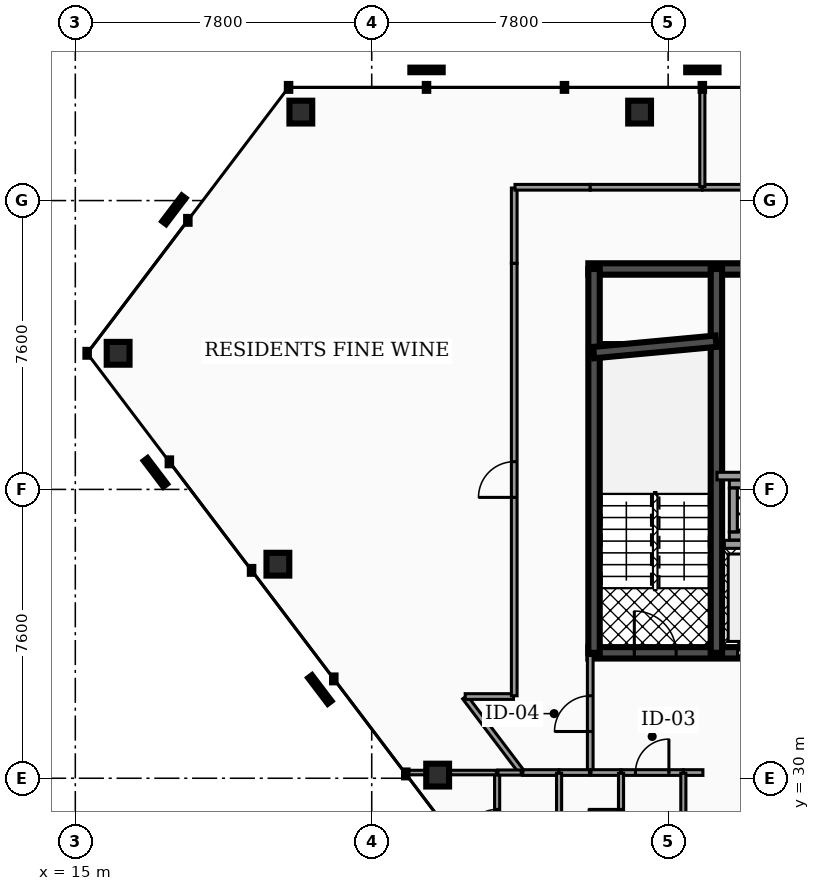
"""IFC4 building model, lengths in metres.
Left out: names, types, materials, properties, quantities, classifications, styles, units other than length and angle.
Written with IfcOpenShell. Run it as: python <this file> out.ifc"""

import sys

from ifc_helpers import new_model, si_unit, direction, frame, frame_2d, origin, origin_2d, place, context, subcontext, project, spatial, rectangle, hollow_rectangle, extrude, element, fill, save


model = new_model("IFC4")
c1 = context("Model", 3, precision=1e-05, world=origin(), true_north=direction((0.0, 1.0)))
c2 = subcontext(c1, "Body", "Model", "MODEL_VIEW")
j1 = project(units=[si_unit("LENGTHUNIT", "METRE"), si_unit("PLANEANGLEUNIT", "RADIAN")], contexts=[c1])
p1 = place(None, origin())
s1 = spatial("IfcSite", under=j1, at=p1, CompositionType="ELEMENT")
p2 = place(p1, origin())
s2 = spatial("IfcBuilding", under=s1, at=p2, CompositionType="ELEMENT")
p3 = place(p2, frame((0.0, 0.0, 232.56)))
s3 = spatial("IfcBuildingStorey", under=s2, at=p3, CompositionType="ELEMENT", Elevation=232.56)
p4 = place(p3, frame((28.5, 43.4, 0.0), z_axis=(0.0, 0.0, 1.0), x_axis=(1.0, 0.0, 0.0)))
e1 = element("IfcWall", 1, at=p4, inside=s3, PredefinedType="SHEAR", context=c2, shape_type="SweptSolid", body=[
    extrude(rectangle(XDim=19.86, YDim=0.3, at=frame_2d((9.93, 0.0))), origin(), (0.0, 0.0, 1.0), 3.18),
])
p5 = place(p3, frame((28.5, 33.3, 0.0), z_axis=(0.0, 0.0, 1.0), x_axis=(1.0, 0.0, 0.0)))
e2 = element("IfcWall", 2, at=p5, inside=s3, PredefinedType="SHEAR", context=c2, shape_type="SweptSolid", body=[
    extrude(rectangle(XDim=19.86, YDim=0.3, at=frame_2d((9.93, 0.0))), origin(), (0.0, 0.0, 1.0), 3.18),
])
p6 = place(p5, frame((3.93, 0.0, 0.0)))
e3 = element("IfcOpeningElement", 3, at=p6, cuts=e2, PredefinedType="OPENING", context=c2, shape_type="SweptSolid", body=[
    extrude(rectangle(XDim=1.1, YDim=2.15, at=frame_2d((0.55, 1.075))), frame((0.0, 0.16, 0.0), z_axis=(0.0, -1.0, 0.0), x_axis=(1.0, 0.0, 0.0)), (0.0, 0.0, 1.0), 0.32),
])
p7 = place(p5, frame((14.77, 0.0, 0.0)))
e4 = element("IfcOpeningElement", 4, at=p7, cuts=e2, PredefinedType="OPENING", context=c2, shape_type="SweptSolid", body=[
    extrude(rectangle(XDim=1.1, YDim=2.15, at=frame_2d((0.55, 1.075))), frame((0.0, 0.16, 0.0), z_axis=(0.0, -1.0, 0.0), x_axis=(1.0, 0.0, 0.0)), (0.0, 0.0, 1.0), 0.32),
])
p8 = place(p5, frame((11.25, 0.0, 0.0)))
e5 = element("IfcOpeningElement", 5, at=p8, cuts=e2, PredefinedType="OPENING", context=c2, shape_type="SweptSolid", body=[
    extrude(rectangle(XDim=1.0, YDim=2.1, at=frame_2d((0.5, 1.05))), frame((0.0, 0.16, 0.0), z_axis=(0.0, -1.0, 0.0), x_axis=(1.0, 0.0, 0.0)), (0.0, 0.0, 1.0), 0.32),
])
p9 = place(p5, frame((12.95, 0.0, 0.0)))
e6 = element("IfcOpeningElement", 6, at=p9, cuts=e2, PredefinedType="OPENING", context=c2, shape_type="SweptSolid", body=[
    extrude(rectangle(XDim=1.0, YDim=2.1, at=frame_2d((0.5, 1.05))), frame((0.0, 0.16, 0.0), z_axis=(0.0, -1.0, 0.0), x_axis=(1.0, 0.0, 0.0)), (0.0, 0.0, 1.0), 0.32),
])
p10 = place(p5, frame((5.85, 0.0, 0.0)))
e7 = element("IfcOpeningElement", 7, at=p10, cuts=e2, PredefinedType="OPENING", context=c2, shape_type="SweptSolid", body=[
    extrude(rectangle(XDim=1.0, YDim=2.1, at=frame_2d((0.5, 1.05))), frame((0.0, 0.16, 0.0), z_axis=(0.0, -1.0, 0.0), x_axis=(1.0, 0.0, 0.0)), (0.0, 0.0, 1.0), 0.32),
])
p11 = place(p5, frame((1.21, 0.0, 0.0)))
e8 = element("IfcOpeningElement", 8, at=p11, cuts=e2, PredefinedType="OPENING", context=c2, shape_type="SweptSolid", body=[
    extrude(rectangle(XDim=1.1, YDim=2.2, at=frame_2d((0.55, 1.1))), frame((0.0, 0.16, 0.0), z_axis=(0.0, -1.0, 0.0), x_axis=(1.0, 0.0, 0.0)), (0.0, 0.0, 1.0), 0.32),
])
p12 = place(p5, frame((9.34, 0.0, 0.0)))
e9 = element("IfcOpeningElement", 9, at=p12, cuts=e2, PredefinedType="OPENING", context=c2, shape_type="SweptSolid", body=[
    extrude(rectangle(XDim=1.12, YDim=2.05, at=frame_2d((0.56, 1.025))), frame((0.0, 0.16, 0.0), z_axis=(0.0, -1.0, 0.0), x_axis=(1.0, 0.0, 0.0)), (0.0, 0.0, 1.0), 0.32),
])
p13 = place(p5, frame((17.55, 0.0, 0.0)))
e10 = element("IfcOpeningElement", 10, at=p13, cuts=e2, PredefinedType="OPENING", context=c2, shape_type="SweptSolid", body=[
    extrude(rectangle(XDim=1.1, YDim=2.2, at=frame_2d((0.55, 1.1))), frame((0.0, 0.16, 0.0), z_axis=(0.0, -1.0, 0.0), x_axis=(1.0, 0.0, 0.0)), (0.0, 0.0, 1.0), 0.32),
])
for number, where, z_axis, x_axis in (
    (11, (28.65, 33.3, 0.0), (0.0, 0.0, 1.0), (0.0, 1.0, 0.0)),
    (12, (31.87, 33.3, 0.0), (0.0, 0.0, 1.0), (0.0, 1.0, 0.0)),
):
    element("IfcWall", number, at=place(p3, frame(where, z_axis=z_axis, x_axis=x_axis)), inside=s3, PredefinedType="SHEAR", context=c2, shape_type="SweptSolid", body=[
        extrude(rectangle(XDim=10.1, YDim=0.3, at=frame_2d((5.05, 0.0))), origin(), (0.0, 0.0, 1.0), 3.18),
    ])
p14 = place(p3, frame((28.64, 41.2, 0.0), z_axis=(0.0, 0.0, 1.0), x_axis=(0.995687118776, 0.092774789157, 0.0)))
e13 = element("IfcWall", 13, at=p14, inside=s3, PredefinedType="SHEAR", context=c2, shape_type="SweptSolid", body=[
    extrude(rectangle(XDim=3.234, YDim=0.3, at=frame_2d((1.617, 0.0))), origin(), (0.0, 0.0, 1.0), 3.18),
])
for number, where, z_axis, x_axis in (
    (14, (29.849, 47.528, 0.0), (0.0, 0.0, 1.0), (1.0, 0.0, 0.0)),
    (15, (20.935, 47.528, 0.0), (0.0, 0.0, 1.0), (1.0, 0.0, 0.0)),
    (16, (16.127, 41.181, 0.0), (0.0, 0.0, 1.0), (1.0, 0.0, 0.0)),
    (17, (20.331, 35.632, 0.0), (0.0, 0.0, 1.0), (1.0, 0.0, 0.0)),
    (18, (24.535, 30.083, 0.0), (0.0, 0.0, 1.0), (1.0, 0.0, 0.0)),
):
    element("IfcColumn", number, at=place(p3, frame(where, z_axis=z_axis, x_axis=x_axis)), inside=s3, PredefinedType="COLUMN", context=c2, shape_type="SweptSolid", body=[
        extrude(hollow_rectangle(XDim=0.6, YDim=0.6, WallThickness=0.03, at=origin_2d()), origin(), (0.0, 0.0, 1.0), 3.18),
    ])
p15 = place(p3, frame((32.08, 36.155, 0.0), z_axis=(0.0, 0.0, 1.0), x_axis=(1.0, 0.0, 0.0)))
e19 = element("IfcWall", 19, at=p15, inside=s3, PredefinedType="SOLIDWALL", context=c2, shape_type="SweptSolid", body=[
    extrude(rectangle(XDim=1.8, YDim=0.21, at=frame_2d((0.9, 0.0))), origin(), (0.0, 0.0, 1.0), 3.18),
])
for number, where, z_axis, x_axis in (
    (20, (32.21, 36.375, 0.0), (0.0, 0.0, 1.0), (1.0, 0.0, 0.0)),
    (21, (32.21, 37.745, 0.0), (0.0, 0.0, 1.0), (1.0, 0.0, 0.0)),
):
    element("IfcWall", number, at=place(p3, frame(where, z_axis=z_axis, x_axis=x_axis)), inside=s3, PredefinedType="SOLIDWALL", context=c2, shape_type="SweptSolid", body=[
        extrude(rectangle(XDim=1.6, YDim=0.21, at=frame_2d((0.8, 0.0))), origin(), (0.0, 0.0, 1.0), 3.18),
    ])
p16 = place(p3, frame((32.315, 36.485, 0.0), z_axis=(0.0, 0.0, 1.0), x_axis=(0.0, 1.0, 0.0)))
e22 = element("IfcWall", 22, at=p16, inside=s3, PredefinedType="SOLIDWALL", context=c2, shape_type="SweptSolid", body=[
    extrude(rectangle(XDim=1.15, YDim=0.21, at=frame_2d((0.575, 0.0))), origin(), (0.0, 0.0, 1.0), 3.18),
])
p17 = place(p3, frame((31.885, 37.95, 0.0), z_axis=(0.0, 0.0, 1.0), x_axis=(1.0, 0.0, 0.0)))
e23 = element("IfcWall", 23, at=p17, inside=s3, PredefinedType="PARTITIONING", context=c2, shape_type="SweptSolid", body=[
    extrude(rectangle(XDim=3.895, YDim=0.2, at=frame_2d((1.948, 0.0))), origin(), (0.0, 0.0, 1.0), 2.235),
])
p18 = place(p3, frame((28.55, 30.17, 0.0), z_axis=(0.0, 0.0, 1.0), x_axis=(0.0, 1.0, 0.0)))
e24 = element("IfcWall", 24, at=p18, inside=s3, PredefinedType="PARTITIONING", context=c2, shape_type="SweptSolid", body=[
    extrude(rectangle(XDim=3.06, YDim=0.15, at=frame_2d((1.53, 0.0))), origin(), (0.0, 0.0, 1.0), 2.235),
])
p19 = place(p18, frame((1.06, 0.0, 0.0)))
e25 = element("IfcOpeningElement", 25, at=p19, cuts=e24, PredefinedType="OPENING", context=c2, shape_type="SweptSolid", body=[
    extrude(rectangle(XDim=0.94, YDim=2.05, at=frame_2d((0.47, 1.025))), frame((0.0, 0.085, 0.0), z_axis=(0.0, -1.0, 0.0), x_axis=(1.0, 0.0, 0.0)), (0.0, 0.0, 1.0), 0.17),
])
p20 = place(p3, frame((29.365, 30.15, 0.0), z_axis=(0.0, 0.0, 1.0), x_axis=(1.0, 0.0, 0.0)))
e26 = element("IfcWall", 26, at=p20, inside=s3, PredefinedType="PARTITIONING", context=c2, shape_type="SweptSolid", body=[
    extrude(rectangle(XDim=1.63, YDim=0.15, at=frame_2d((0.815, 0.0))), origin(), (0.0, 0.0, 1.0), 2.235),
])
p21 = place(p20, frame((0.375, 0.0, 0.0)))
e27 = element("IfcOpeningElement", 27, at=p21, cuts=e26, PredefinedType="OPENING", context=c2, shape_type="SweptSolid", body=[
    extrude(rectangle(XDim=0.88, YDim=2.05, at=frame_2d((0.44, 1.025))), frame((0.0, 0.085, 0.0), z_axis=(0.0, -1.0, 0.0), x_axis=(1.0, 0.0, 0.0)), (0.0, 0.0, 1.0), 0.17),
])
p22 = place(p3, frame((28.57, 30.15, 0.0), z_axis=(0.0, 0.0, 1.0), x_axis=(1.0, 0.0, 0.0)))
e28 = element("IfcWall", 28, at=p22, inside=s3, PredefinedType="PARTITIONING", context=c2, shape_type="SweptSolid", body=[
    extrude(rectangle(XDim=0.785, YDim=0.15, at=frame_2d((0.393, 0.0))), origin(), (0.0, 0.0, 1.0), 2.235),
])
p23 = place(p3, frame((31.005, 30.15, 0.0), z_axis=(0.0, 0.0, 1.0), x_axis=(1.0, 0.0, 0.0)))
e29 = element("IfcWall", 29, at=p23, inside=s3, PredefinedType="PARTITIONING", context=c2, shape_type="SweptSolid", body=[
    extrude(rectangle(XDim=0.51, YDim=0.15, at=frame_2d((0.255, 0.0))), origin(), (0.0, 0.0, 1.0), 2.235),
])
p24 = place(p3, frame((26.775, 30.15, 0.0), z_axis=(0.0, 0.0, 1.0), x_axis=(1.0, 0.0, 0.0)))
e30 = element("IfcWall", 30, at=p24, inside=s3, PredefinedType="PARTITIONING", context=c2, shape_type="SweptSolid", body=[
    extrude(rectangle(XDim=0.95, YDim=0.15, at=frame_2d((0.475, 0.0))), origin(), (0.0, 0.0, 1.0), 2.235),
])
p25 = place(p3, frame((27.735, 30.15, 0.0), z_axis=(0.0, 0.0, 1.0), x_axis=(1.0, 0.0, 0.0)))
e31 = element("IfcWall", 31, at=p25, inside=s3, PredefinedType="PARTITIONING", context=c2, shape_type="SweptSolid", body=[
    extrude(rectangle(XDim=0.795, YDim=0.15, at=frame_2d((0.397, 0.0))), origin(), (0.0, 0.0, 1.0), 2.235),
])
p26 = place(p3, frame((25.252, 32.134, 0.0), z_axis=(0.0, 0.0, 1.0), x_axis=(0.603869110647, -0.797083494502, 0.0)))
e32 = element("IfcWall", 32, at=p26, inside=s3, PredefinedType="PARTITIONING", context=c2, shape_type="SweptSolid", body=[
    extrude(rectangle(XDim=2.469, YDim=0.15, at=frame_2d((1.234, 0.0))), origin(), (0.0, 0.0, 1.0), 2.235),
])
p27 = place(p3, frame((25.26, 32.15, 0.0), z_axis=(0.0, 0.0, 1.0), x_axis=(1.0, 0.0, 0.0)))
e33 = element("IfcWall", 33, at=p27, inside=s3, PredefinedType="PARTITIONING", context=c2, shape_type="SweptSolid", body=[
    extrude(rectangle(XDim=1.271, YDim=0.15, at=frame_2d((0.635, 0.0))), origin(), (0.0, 0.0, 1.0), 2.235),
])
p28 = place(p3, frame((26.55, 32.17, 0.0), z_axis=(0.0, 0.0, 1.0), x_axis=(0.0, 1.0, 0.0)))
e34 = element("IfcWall", 34, at=p28, inside=s3, PredefinedType="PARTITIONING", context=c2, shape_type="SweptSolid", body=[
    extrude(rectangle(XDim=11.38, YDim=0.15, at=frame_2d((5.69, 0.0))), origin(), (0.0, 0.0, 1.0), 2.235),
])
p29 = place(p28, frame((5.22, 0.0, 0.0)))
e35 = element("IfcOpeningElement", 35, at=p29, cuts=e34, PredefinedType="OPENING", context=c2, shape_type="SweptSolid", body=[
    extrude(rectangle(XDim=0.94, YDim=2.05, at=frame_2d((0.47, 1.025))), frame((0.0, 0.085, 0.0), z_axis=(0.0, -1.0, 0.0), x_axis=(1.0, 0.0, 0.0)), (0.0, 0.0, 1.0), 0.17),
])
for number, where, z_axis, x_axis in (
    (36, (26.55, 43.55, 0.0), (0.0, 0.0, 1.0), (0.0, 1.0, 0.0)),
    (37, (26.57, 45.55, 0.0), (0.0, 0.0, 1.0), (1.0, 0.0, 0.0)),
):
    element("IfcWall", number, at=place(p3, frame(where, z_axis=z_axis, x_axis=x_axis)), inside=s3, PredefinedType="PARTITIONING", context=c2, shape_type="SweptSolid", body=[
        extrude(rectangle(XDim=1.98, YDim=0.15, at=frame_2d((0.99, 0.0))), origin(), (0.0, 0.0, 1.0), 2.235),
    ])
p30 = place(p3, frame((28.55, 45.55, 0.0), z_axis=(0.0, 0.0, 1.0), x_axis=(1.0, 0.0, 0.0)))
e38 = element("IfcWall", 38, at=p30, inside=s3, PredefinedType="PARTITIONING", context=c2, shape_type="SweptSolid", body=[
    extrude(rectangle(XDim=2.945, YDim=0.15, at=frame_2d((1.473, 0.0))), origin(), (0.0, 0.0, 1.0), 2.235),
])
p31 = place(p3, frame((31.505, 45.55, 0.0), z_axis=(0.0, 0.0, 1.0), x_axis=(1.0, 0.0, 0.0)))
e39 = element("IfcWall", 39, at=p31, inside=s3, PredefinedType="PARTITIONING", context=c2, shape_type="SweptSolid", body=[
    extrude(rectangle(XDim=2.474, YDim=0.15, at=frame_2d((1.237, 0.0))), origin(), (0.0, 0.0, 1.0), 2.235),
])
p32 = place(p3, frame((29.36, 27.37, 0.0), z_axis=(0.0, 0.0, 1.0), x_axis=(0.0, 1.0, 0.0)))
e40 = element("IfcWall", 40, at=p32, inside=s3, PredefinedType="PARTITIONING", context=c2, shape_type="SweptSolid", body=[
    extrude(rectangle(XDim=2.76, YDim=0.135, at=frame_2d((1.38, 0.0))), origin(), (0.0, 0.0, 1.0), 2.235),
])
p33 = place(p32, frame((0.95, 0.0, 0.0)))
e41 = element("IfcOpeningElement", 41, at=p33, cuts=e40, PredefinedType="OPENING", context=c2, shape_type="SweptSolid", body=[
    extrude(rectangle(XDim=0.86, YDim=2.05, at=frame_2d((0.43, 1.025))), frame((0.0, 0.077, 0.0), z_axis=(0.0, -1.0, 0.0), x_axis=(1.0, 0.0, 0.0)), (0.0, 0.0, 1.0), 0.155),
])
for number, where, z_axis, x_axis in (
    (42, (31.0, 27.37, 0.0), (0.0, 0.0, 1.0), (0.0, 1.0, 0.0)),
    (43, (27.73, 27.37, 0.0), (0.0, 0.0, 1.0), (0.0, 1.0, 0.0)),
):
    element("IfcWall", number, at=place(p3, frame(where, z_axis=z_axis, x_axis=x_axis)), inside=s3, PredefinedType="PARTITIONING", context=c2, shape_type="SweptSolid", body=[
        extrude(rectangle(XDim=2.76, YDim=0.135, at=frame_2d((1.38, 0.0))), origin(), (0.0, 0.0, 1.0), 2.235),
    ])
p34 = place(p3, frame((26.1, 27.37, 0.0), z_axis=(0.0, 0.0, 1.0), x_axis=(0.0, 1.0, 0.0)))
e44 = element("IfcWall", 44, at=p34, inside=s3, PredefinedType="PARTITIONING", context=c2, shape_type="SweptSolid", body=[
    extrude(rectangle(XDim=2.76, YDim=0.135, at=frame_2d((1.38, 0.0))), origin(), (0.0, 0.0, 1.0), 2.235),
])
p35 = place(p34, frame((0.95, 0.0, 0.0)))
e45 = element("IfcOpeningElement", 45, at=p35, cuts=e44, PredefinedType="OPENING", context=c2, shape_type="SweptSolid", body=[
    extrude(rectangle(XDim=0.86, YDim=2.05, at=frame_2d((0.43, 1.025))), frame((0.0, 0.077, 0.0), z_axis=(0.0, -1.0, 0.0), x_axis=(1.0, 0.0, 0.0)), (0.0, 0.0, 1.0), 0.155),
])
p36 = place(p3, frame((26.12, 30.15, 0.0), z_axis=(0.0, 0.0, 1.0), x_axis=(1.0, 0.0, 0.0)))
e46 = element("IfcWall", 46, at=p36, inside=s3, PredefinedType="PARTITIONING", context=c2, shape_type="SweptSolid", body=[
    extrude(rectangle(XDim=0.615, YDim=0.135, at=frame_2d((0.307, 0.0))), origin(), (0.0, 0.0, 1.0), 2.235),
])
p37 = place(p3, frame((23.684, 30.15, 0.0), z_axis=(0.0, 0.0, 1.0), x_axis=(1.0, 0.0, 0.0)))
e47 = element("IfcWall", 47, at=p37, inside=s3, PredefinedType="PARTITIONING", context=c2, shape_type="SweptSolid", body=[
    extrude(rectangle(XDim=0.562, YDim=0.12, at=frame_2d((0.281, 0.0))), origin(), (0.0, 0.0, 1.0), 2.235),
])
p38 = place(p3, frame((24.754, 30.15, 0.0), z_axis=(0.0, 0.0, 1.0), x_axis=(1.0, 0.0, 0.0)))
e48 = element("IfcWall", 48, at=p38, inside=s3, PredefinedType="PARTITIONING", context=c2, shape_type="SweptSolid", body=[
    extrude(rectangle(XDim=1.326, YDim=0.12, at=frame_2d((0.663, 0.0))), origin(), (0.0, 0.0, 1.0), 2.235),
])
p39 = place(p3, frame((31.5, 45.57, 0.0), z_axis=(0.0, 0.0, 1.0), x_axis=(0.0, 1.0, 0.0)))
e49 = element("IfcWall", 49, at=p39, inside=s3, PredefinedType="PARTITIONING", context=c2, shape_type="SweptSolid", body=[
    extrude(rectangle(XDim=2.593, YDim=0.135, at=frame_2d((1.296, 0.0))), origin(), (0.0, 0.0, 1.0), 2.235),
])
p40 = place(p6, origin())
e50 = element("IfcDoor", 50, at=p40, inside=s3, OperationType="SLIDING_TO_LEFT", PredefinedType="DOOR", context=c2, shape_type="SweptSolid", body=[
    extrude(rectangle(XDim=1.1, YDim=2.15, at=frame_2d((0.55, 1.075))), frame((0.0, 0.025, 0.0), z_axis=(0.0, -1.0, 0.0), x_axis=(1.0, 0.0, 0.0)), (0.0, 0.0, 1.0), 0.05),
])
fill(e3, e50)
p41 = place(p11, origin())
e51 = element("IfcDoor", 51, at=p41, inside=s3, OperationType="SINGLE_SWING_LEFT", PredefinedType="DOOR", context=c2, shape_type="SweptSolid", body=[
    extrude(rectangle(XDim=1.1, YDim=2.2, at=frame_2d((0.55, 1.1))), frame((0.0, 0.025, 0.0), z_axis=(0.0, -1.0, 0.0), x_axis=(1.0, 0.0, 0.0)), (0.0, 0.0, 1.0), 0.05),
])
fill(e8, e51)
p42 = place(p19, origin())
e52 = element("IfcDoor", 52, at=p42, inside=s3, OperationType="SINGLE_SWING_LEFT", PredefinedType="DOOR", context=c2, shape_type="SweptSolid", body=[
    extrude(rectangle(XDim=0.94, YDim=2.05, at=frame_2d((0.47, 1.025))), frame((0.0, 0.025, 0.0), z_axis=(0.0, -1.0, 0.0), x_axis=(1.0, 0.0, 0.0)), (0.0, 0.0, 1.0), 0.05),
])
fill(e25, e52)
p43 = place(p21, origin())
e53 = element("IfcDoor", 53, at=p43, inside=s3, OperationType="SINGLE_SWING_RIGHT", PredefinedType="DOOR", context=c2, shape_type="SweptSolid", body=[
    extrude(rectangle(XDim=0.88, YDim=2.05, at=frame_2d((0.44, 1.025))), frame((0.0, 0.025, 0.0), z_axis=(0.0, -1.0, 0.0), x_axis=(1.0, 0.0, 0.0)), (0.0, 0.0, 1.0), 0.05),
])
fill(e27, e53)
p44 = place(p29, origin())
e54 = element("IfcDoor", 54, at=p44, inside=s3, OperationType="SINGLE_SWING_LEFT", PredefinedType="DOOR", context=c2, shape_type="SweptSolid", body=[
    extrude(rectangle(XDim=0.94, YDim=2.05, at=frame_2d((0.47, 1.025))), frame((0.0, 0.025, 0.0), z_axis=(0.0, -1.0, 0.0), x_axis=(1.0, 0.0, 0.0)), (0.0, 0.0, 1.0), 0.05),
])
fill(e35, e54)
p45 = place(p33, origin())
e55 = element("IfcDoor", 55, at=p45, inside=s3, OperationType="SINGLE_SWING_RIGHT", PredefinedType="DOOR", context=c2, shape_type="SweptSolid", body=[
    extrude(rectangle(XDim=0.86, YDim=2.05, at=frame_2d((0.43, 1.025))), frame((0.0, 0.025, 0.0), z_axis=(0.0, -1.0, 0.0), x_axis=(1.0, 0.0, 0.0)), (0.0, 0.0, 1.0), 0.05),
])
fill(e41, e55)
p46 = place(p35, origin())
e56 = element("IfcDoor", 56, at=p46, inside=s3, OperationType="SINGLE_SWING_LEFT", PredefinedType="DOOR", context=c2, shape_type="SweptSolid", body=[
    extrude(rectangle(XDim=0.86, YDim=2.05, at=frame_2d((0.43, 1.025))), frame((0.0, 0.025, 0.0), z_axis=(0.0, -1.0, 0.0), x_axis=(1.0, 0.0, 0.0)), (0.0, 0.0, 1.0), 0.05),
])
fill(e45, e56)
save(model, sys.argv[1])
